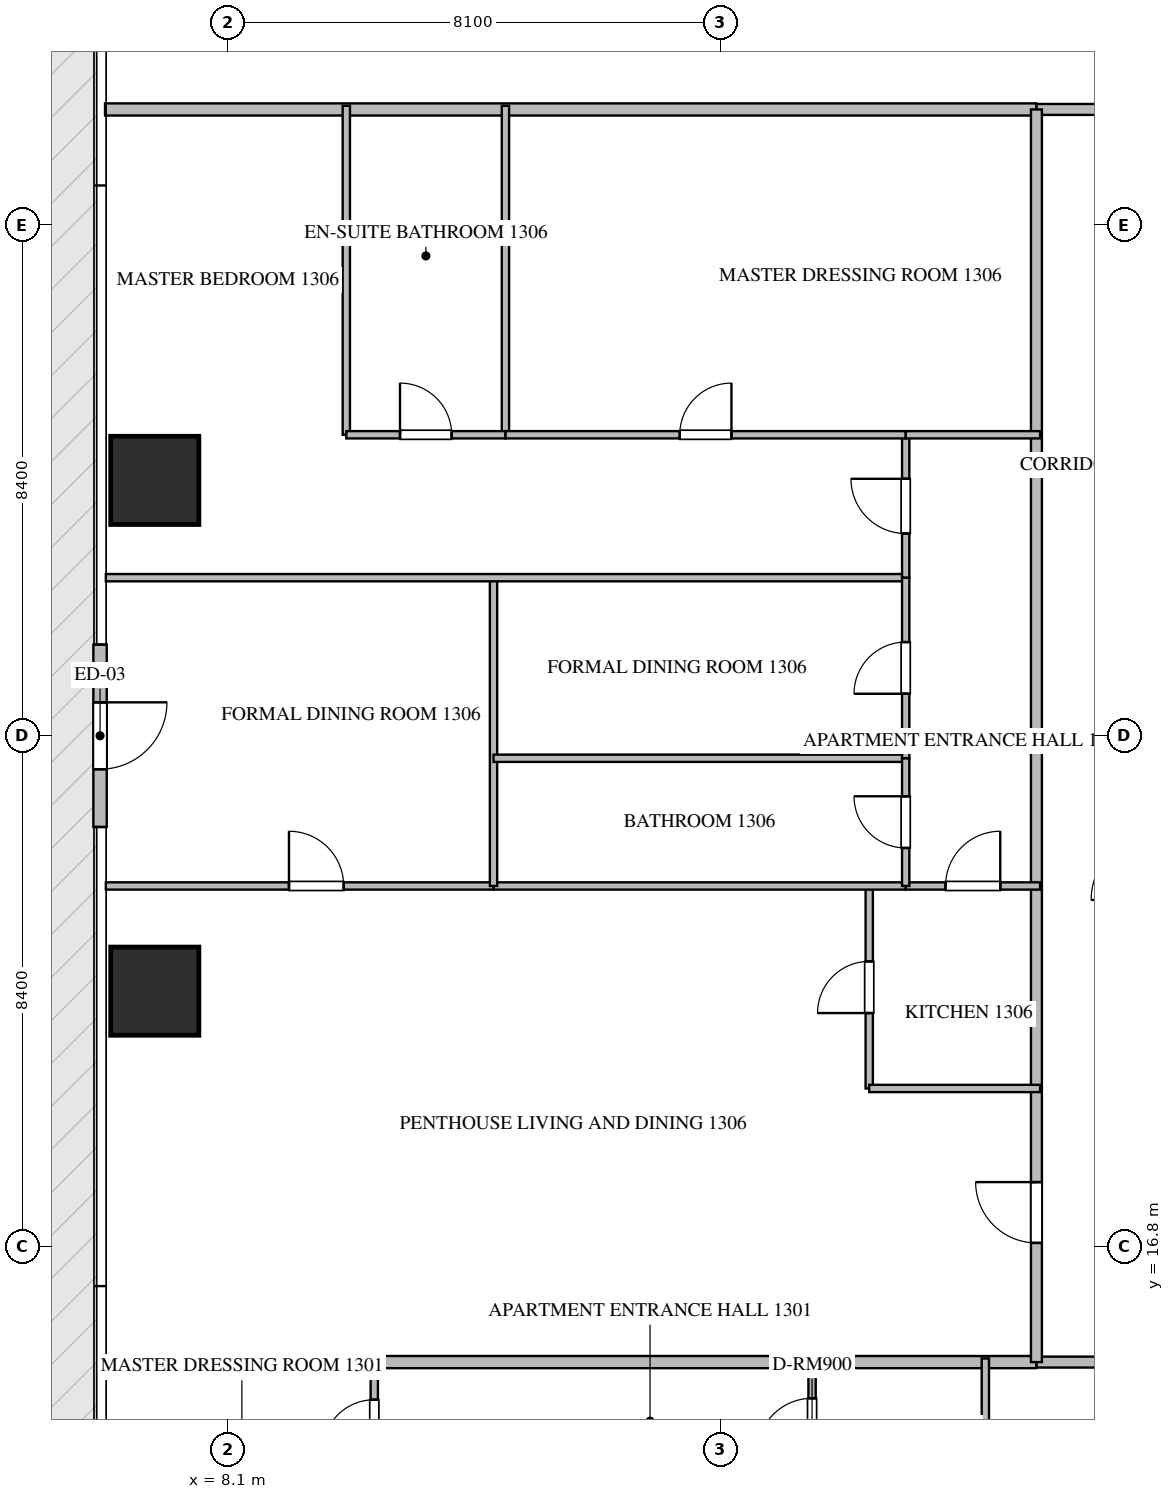
"""IFC4 building model, lengths in metres.
Left out: names, types, materials, properties, quantities, classifications, styles, units other than length and angle.
Written with IfcOpenShell. Run it as: python <this file> out.ifc"""

import sys

from ifc_helpers import new_model, si_unit, direction, frame, frame_2d, origin, origin_2d, place, context, subcontext, project, spatial, rectangle, extrude, source, transform, mapped, element, fill, save


model = new_model("IFC4")
c1 = context("Model", 3, precision=1e-05, world=origin(), true_north=direction((0.0, 1.0)))
c2 = subcontext(c1, "Body", "Model", "MODEL_VIEW")
j1 = project(units=[si_unit("LENGTHUNIT", "METRE"), si_unit("PLANEANGLEUNIT", "RADIAN")], contexts=[c1])
p1 = place(None, origin())
s1 = spatial("IfcSite", under=j1, at=p1, CompositionType="ELEMENT")
p2 = place(p1, origin())
s2 = spatial("IfcBuilding", under=s1, at=p2, CompositionType="ELEMENT")
p3 = place(p2, frame((0.0, 0.0, 56.7)))
s3 = spatial("IfcBuildingStorey", under=s2, at=p3, CompositionType="ELEMENT", Elevation=56.7)
m1 = source(origin(), c2, "Body", "SweptSolid", [
    extrude(rectangle(XDim=1.45, YDim=1.45, at=origin_2d()), origin(), (0.0, 0.0, 1.0), 3.75),
])
for number, where, z_axis, x_axis in (
    (1, (6.9, 21.0, -0.26), (0.0, 0.0, 1.0), (1.0, 0.0, 0.0)),
    (2, (6.9, 29.4, -0.26), (0.0, 0.0, 1.0), (1.0, 0.0, 0.0)),
):
    element("IfcColumn", number, at=place(p3, frame(where, z_axis=z_axis, x_axis=x_axis)), inside=s3, PredefinedType="COLUMN", context=c2, shape_type="MappedRepresentation", body=[
        mapped(m1, transform((0.0, 0.0, 0.0), scale=1.0)),
    ])
p4 = place(p3, frame((6.0, 26.7, 0.0), z_axis=(0.0, 0.0, 1.0), x_axis=(0.0, -1.0, 0.0)))
e3 = element("IfcWall", 3, at=p4, inside=s3, PredefinedType="ELEMENTEDWALL", context=c2, shape_type="SweptSolid", body=[
    extrude(rectangle(XDim=3.0, YDim=0.22, at=frame_2d((1.5, 0.0))), origin(), (0.0, 0.0, 1.0), 3.475),
])
p5 = place(p4, frame((0.95, 0.0, 0.0)))
e4 = element("IfcOpeningElement", 4, at=p5, cuts=e3, PredefinedType="OPENING", context=c2, shape_type="SweptSolid", body=[
    extrude(rectangle(XDim=1.1, YDim=2.2, at=frame_2d((0.55, 1.1))), frame((0.0, 0.12, 0.0), z_axis=(0.0, -1.0, 0.0), x_axis=(1.0, 0.0, 0.0)), (0.0, 0.0, 1.0), 0.24),
])
for number, where, z_axis, x_axis in (
    (5, (6.082, 14.9, 0.0), (0.0, 0.0, 1.0), (1.0, 0.0, 0.0)),
    (6, (6.082, 35.5, 0.0), (0.0, 0.0, 1.0), (1.0, 0.0, 0.0)),
):
    element("IfcWall", number, at=place(p3, frame(where, z_axis=z_axis, x_axis=x_axis)), inside=s3, PredefinedType="PARTITIONING", context=c2, shape_type="SweptSolid", body=[
        extrude(rectangle(XDim=15.318, YDim=0.2, at=frame_2d((7.659, 0.0))), origin(), (0.0, 0.0, 1.0), 3.49),
    ])
p6 = place(p3, frame((21.402, 14.9, 0.0), z_axis=(0.0, 0.0, 1.0), x_axis=(1.0, 0.0, 0.0)))
e7 = element("IfcWall", 7, at=p6, inside=s3, PredefinedType="PARTITIONING", context=c2, shape_type="SweptSolid", body=[
    extrude(rectangle(XDim=21.996, YDim=0.18, at=frame_2d((10.998, 0.0))), origin(), (0.0, 0.0, 1.0), 3.49),
])
p7 = place(p6, frame((1.96, 0.0, 0.0)))
e8 = element("IfcOpeningElement", 8, at=p7, cuts=e7, PredefinedType="OPENING", context=c2, shape_type="SweptSolid", body=[
    extrude(rectangle(XDim=1.0, YDim=2.15, at=frame_2d((0.5, 1.075))), frame((0.0, 0.1, 0.0), z_axis=(0.0, -1.0, 0.0), x_axis=(1.0, 0.0, 0.0)), (0.0, 0.0, 1.0), 0.2),
])
p8 = place(p6, frame((5.249, 0.0, 0.0)))
e9 = element("IfcOpeningElement", 9, at=p8, cuts=e7, PredefinedType="OPENING", context=c2, shape_type="SweptSolid", body=[
    extrude(rectangle(XDim=1.0, YDim=2.15, at=frame_2d((0.5, 1.075))), frame((0.0, 0.1, 0.0), z_axis=(0.0, -1.0, 0.0), x_axis=(1.0, 0.0, 0.0)), (0.0, 0.0, 1.0), 0.2),
])
p9 = place(p6, frame((11.653, 0.0, 0.0)))
e10 = element("IfcOpeningElement", 10, at=p9, cuts=e7, PredefinedType="OPENING", context=c2, shape_type="SweptSolid", body=[
    extrude(rectangle(XDim=1.0, YDim=2.15, at=frame_2d((0.5, 1.075))), frame((0.0, 0.1, 0.0), z_axis=(0.0, -1.0, 0.0), x_axis=(1.0, 0.0, 0.0)), (0.0, 0.0, 1.0), 0.2),
])
p10 = place(p6, frame((18.896, 0.0, 0.0)))
e11 = element("IfcOpeningElement", 11, at=p10, cuts=e7, PredefinedType="OPENING", context=c2, shape_type="SweptSolid", body=[
    extrude(rectangle(XDim=1.0, YDim=2.15, at=frame_2d((0.5, 1.075))), frame((0.0, 0.1, 0.0), z_axis=(0.0, -1.0, 0.0), x_axis=(1.0, 0.0, 0.0)), (0.0, 0.0, 1.0), 0.2),
])
p11 = place(p3, frame((21.402, 35.5, 0.0), z_axis=(0.0, 0.0, 1.0), x_axis=(1.0, 0.0, 0.0)))
e12 = element("IfcWall", 12, at=p11, inside=s3, PredefinedType="PARTITIONING", context=c2, shape_type="SweptSolid", body=[
    extrude(rectangle(XDim=21.996, YDim=0.18, at=frame_2d((10.998, 0.0))), origin(), (0.0, 0.0, 1.0), 3.49),
])
p12 = place(p11, frame((15.222, 0.0, 0.0)))
e13 = element("IfcOpeningElement", 13, at=p12, cuts=e12, PredefinedType="OPENING", context=c2, shape_type="SweptSolid", body=[
    extrude(rectangle(XDim=1.0, YDim=2.15, at=frame_2d((0.5, 1.075))), frame((0.0, 0.1, 0.0), z_axis=(0.0, -1.0, 0.0), x_axis=(1.0, 0.0, 0.0)), (0.0, 0.0, 1.0), 0.2),
])
p13 = place(p3, frame((21.4, 14.9, 0.0), z_axis=(0.0, 0.0, 1.0), x_axis=(0.0, 1.0, 0.0)))
e14 = element("IfcWall", 14, at=p13, inside=s3, PredefinedType="PARTITIONING", context=c2, shape_type="SweptSolid", body=[
    extrude(rectangle(XDim=20.6, YDim=0.18, at=frame_2d((10.3, 0.0))), origin(), (0.0, 0.0, 1.0), 3.49),
])
p14 = place(p13, frame((1.96, 0.0, 0.0)))
e15 = element("IfcOpeningElement", 15, at=p14, cuts=e14, PredefinedType="OPENING", context=c2, shape_type="SweptSolid", body=[
    extrude(rectangle(XDim=1.0, YDim=2.15, at=frame_2d((0.5, 1.075))), frame((0.0, 0.1, 0.0), z_axis=(0.0, -1.0, 0.0), x_axis=(1.0, 0.0, 0.0)), (0.0, 0.0, 1.0), 0.2),
])
p15 = place(p3, frame((20.56, 12.15, 0.0), z_axis=(0.0, 0.0, 1.0), x_axis=(0.0, 1.0, 0.0)))
e16 = element("IfcWall", 16, at=p15, inside=s3, PredefinedType="PARTITIONING", context=c2, shape_type="SweptSolid", body=[
    extrude(rectangle(XDim=2.81, YDim=0.12, at=frame_2d((1.405, 0.0))), origin(), (0.0, 0.0, 1.0), 3.49),
])
p16 = place(p3, frame((17.71, 12.75, 0.0), z_axis=(0.0, 0.0, 1.0), x_axis=(0.0, 1.0, 0.0)))
e17 = element("IfcWall", 17, at=p16, inside=s3, PredefinedType="PARTITIONING", context=c2, shape_type="SweptSolid", body=[
    extrude(rectangle(XDim=2.21, YDim=0.12, at=frame_2d((1.105, 0.0))), origin(), (0.0, 0.0, 1.0), 3.49),
])
p17 = place(p16, frame((0.655, 0.0, 0.0)))
e18 = element("IfcOpeningElement", 18, at=p17, cuts=e17, PredefinedType="OPENING", context=c2, shape_type="SweptSolid", body=[
    extrude(rectangle(XDim=0.9, YDim=2.1, at=frame_2d((0.45, 1.05))), frame((0.0, 0.07, 0.0), z_axis=(0.0, -1.0, 0.0), x_axis=(1.0, 0.0, 0.0)), (0.0, 0.0, 1.0), 0.14),
])
p18 = place(p3, frame((10.51, 12.752, 0.0), z_axis=(0.0, 0.0, 1.0), x_axis=(0.0, 1.0, 0.0)))
e19 = element("IfcWall", 19, at=p18, inside=s3, PredefinedType="PARTITIONING", context=c2, shape_type="SweptSolid", body=[
    extrude(rectangle(XDim=2.208, YDim=0.12, at=frame_2d((1.104, 0.0))), origin(), (0.0, 0.0, 1.0), 3.49),
])
p19 = place(p18, frame((0.679, 0.0, 0.0)))
e20 = element("IfcOpeningElement", 20, at=p19, cuts=e19, PredefinedType="OPENING", context=c2, shape_type="SweptSolid", body=[
    extrude(rectangle(XDim=0.85, YDim=2.1, at=frame_2d((0.425, 1.05))), frame((0.0, 0.07, 0.0), z_axis=(0.0, -1.0, 0.0), x_axis=(1.0, 0.0, 0.0)), (0.0, 0.0, 1.0), 0.14),
])
p20 = place(p3, frame((18.65, 19.4, 0.0), z_axis=(0.0, 0.0, 1.0), x_axis=(0.0, 1.0, 0.0)))
e21 = element("IfcWall", 21, at=p20, inside=s3, PredefinedType="PARTITIONING", context=c2, shape_type="SweptSolid", body=[
    extrude(rectangle(XDim=3.33, YDim=0.12, at=frame_2d((1.665, 0.0))), origin(), (0.0, 0.0, 1.0), 3.49),
])
p21 = place(p20, frame((1.24, 0.0, 0.0)))
e22 = element("IfcOpeningElement", 22, at=p21, cuts=e21, PredefinedType="OPENING", context=c2, shape_type="SweptSolid", body=[
    extrude(rectangle(XDim=0.85, YDim=2.1, at=frame_2d((0.425, 1.05))), frame((0.0, 0.07, 0.0), z_axis=(0.0, -1.0, 0.0), x_axis=(1.0, 0.0, 0.0)), (0.0, 0.0, 1.0), 0.14),
])
p22 = place(p3, frame((18.65, 19.4, 0.0), z_axis=(0.0, 0.0, 1.0), x_axis=(1.0, 0.0, 0.0)))
e23 = element("IfcWall", 23, at=p22, inside=s3, PredefinedType="PARTITIONING", context=c2, shape_type="SweptSolid", body=[
    extrude(rectangle(XDim=2.81, YDim=0.12, at=frame_2d((1.405, 0.0))), origin(), (0.0, 0.0, 1.0), 3.49),
])
p23 = place(p3, frame((19.25, 22.73, 0.0), z_axis=(0.0, 0.0, 1.0), x_axis=(1.0, 0.0, 0.0)))
e24 = element("IfcWall", 24, at=p23, inside=s3, PredefinedType="PARTITIONING", context=c2, shape_type="SweptSolid", body=[
    extrude(rectangle(XDim=2.21, YDim=0.12, at=frame_2d((1.105, 0.0))), origin(), (0.0, 0.0, 1.0), 3.49),
])
p24 = place(p23, frame((0.655, 0.0, 0.0)))
e25 = element("IfcOpeningElement", 25, at=p24, cuts=e24, PredefinedType="OPENING", context=c2, shape_type="SweptSolid", body=[
    extrude(rectangle(XDim=0.9, YDim=2.1, at=frame_2d((0.45, 1.05))), frame((0.0, 0.07, 0.0), z_axis=(0.0, -1.0, 0.0), x_axis=(1.0, 0.0, 0.0)), (0.0, 0.0, 1.0), 0.14),
])
p25 = place(p3, frame((6.095, 22.73, 0.0), z_axis=(0.0, 0.0, 1.0), x_axis=(1.0, 0.0, 0.0)))
e26 = element("IfcWall", 26, at=p25, inside=s3, PredefinedType="PARTITIONING", context=c2, shape_type="SweptSolid", body=[
    extrude(rectangle(XDim=6.376, YDim=0.12, at=frame_2d((3.188, 0.0))), origin(), (0.0, 0.0, 1.0), 3.49),
])
p26 = place(p25, frame((3.012, 0.0, 0.0)))
e27 = element("IfcOpeningElement", 27, at=p26, cuts=e26, PredefinedType="OPENING", context=c2, shape_type="SweptSolid", body=[
    extrude(rectangle(XDim=0.9, YDim=2.1, at=frame_2d((0.45, 1.05))), frame((0.0, 0.07, 0.0), z_axis=(0.0, -1.0, 0.0), x_axis=(1.0, 0.0, 0.0)), (0.0, 0.0, 1.0), 0.14),
])
p27 = place(p3, frame((12.473, 22.73, 0.0), z_axis=(0.0, 0.0, 1.0), x_axis=(1.0, 0.0, 0.0)))
e28 = element("IfcWall", 28, at=p27, inside=s3, PredefinedType="PARTITIONING", context=c2, shape_type="SweptSolid", body=[
    extrude(rectangle(XDim=6.775, YDim=0.12, at=frame_2d((3.388, 0.0))), origin(), (0.0, 0.0, 1.0), 3.49),
])
p28 = place(p3, frame((12.471, 22.73, 0.0), z_axis=(0.0, 0.0, 1.0), x_axis=(0.0, 1.0, 0.0)))
e29 = element("IfcWall", 29, at=p28, inside=s3, PredefinedType="PARTITIONING", context=c2, shape_type="SweptSolid", body=[
    extrude(rectangle(XDim=5.07, YDim=0.12, at=frame_2d((2.535, 0.0))), origin(), (0.0, 0.0, 1.0), 3.49),
])
p29 = place(p3, frame((6.095, 27.8, 0.0), z_axis=(0.0, 0.0, 1.0), x_axis=(1.0, 0.0, 0.0)))
e30 = element("IfcWall", 30, at=p29, inside=s3, PredefinedType="PARTITIONING", context=c2, shape_type="SweptSolid", body=[
    extrude(rectangle(XDim=13.155, YDim=0.12, at=frame_2d((6.578, 0.0))), origin(), (0.0, 0.0, 1.0), 3.49),
])
p30 = place(p3, frame((12.471, 24.83, 0.0), z_axis=(0.0, 0.0, 1.0), x_axis=(1.0, 0.0, 0.0)))
e31 = element("IfcWall", 31, at=p30, inside=s3, PredefinedType="PARTITIONING", context=c2, shape_type="SweptSolid", body=[
    extrude(rectangle(XDim=6.779, YDim=0.12, at=frame_2d((3.39, 0.0))), origin(), (0.0, 0.0, 1.0), 3.49),
])
p31 = place(p3, frame((19.25, 22.73, 0.0), z_axis=(0.0, 0.0, 1.0), x_axis=(0.0, 1.0, 0.0)))
e32 = element("IfcWall", 32, at=p31, inside=s3, PredefinedType="PARTITIONING", context=c2, shape_type="SweptSolid", body=[
    extrude(rectangle(XDim=2.1, YDim=0.12, at=frame_2d((1.05, 0.0))), origin(), (0.0, 0.0, 1.0), 3.49),
])
p32 = place(p31, frame((0.625, 0.0, 0.0)))
e33 = element("IfcOpeningElement", 33, at=p32, cuts=e32, PredefinedType="OPENING", context=c2, shape_type="SweptSolid", body=[
    extrude(rectangle(XDim=0.85, YDim=2.1, at=frame_2d((0.425, 1.05))), frame((0.0, 0.07, 0.0), z_axis=(0.0, -1.0, 0.0), x_axis=(1.0, 0.0, 0.0)), (0.0, 0.0, 1.0), 0.14),
])
p33 = place(p3, frame((19.25, 24.832, 0.0), z_axis=(0.0, 0.0, 1.0), x_axis=(0.0, 1.0, 0.0)))
e34 = element("IfcWall", 34, at=p33, inside=s3, PredefinedType="PARTITIONING", context=c2, shape_type="SweptSolid", body=[
    extrude(rectangle(XDim=2.968, YDim=0.12, at=frame_2d((1.484, 0.0))), origin(), (0.0, 0.0, 1.0), 3.49),
])
p34 = place(p33, frame((1.059, 0.0, 0.0)))
e35 = element("IfcOpeningElement", 35, at=p34, cuts=e34, PredefinedType="OPENING", context=c2, shape_type="SweptSolid", body=[
    extrude(rectangle(XDim=0.85, YDim=2.1, at=frame_2d((0.425, 1.05))), frame((0.0, 0.07, 0.0), z_axis=(0.0, -1.0, 0.0), x_axis=(1.0, 0.0, 0.0)), (0.0, 0.0, 1.0), 0.14),
])
p35 = place(p3, frame((19.25, 27.802, 0.0), z_axis=(0.0, 0.0, 1.0), x_axis=(0.0, 1.0, 0.0)))
e36 = element("IfcWall", 36, at=p35, inside=s3, PredefinedType="PARTITIONING", context=c2, shape_type="SweptSolid", body=[
    extrude(rectangle(XDim=2.348, YDim=0.12, at=frame_2d((1.174, 0.0))), origin(), (0.0, 0.0, 1.0), 3.49),
])
p36 = place(p35, frame((0.724, 0.0, 0.0)))
e37 = element("IfcOpeningElement", 37, at=p36, cuts=e36, PredefinedType="OPENING", context=c2, shape_type="SweptSolid", body=[
    extrude(rectangle(XDim=0.9, YDim=2.1, at=frame_2d((0.45, 1.05))), frame((0.0, 0.07, 0.0), z_axis=(0.0, -1.0, 0.0), x_axis=(1.0, 0.0, 0.0)), (0.0, 0.0, 1.0), 0.14),
])
for number, where, z_axis, x_axis in (
    (38, (10.05, 30.15, 0.0), (0.0, 0.0, 1.0), (0.0, 1.0, 0.0)),
    (39, (12.667, 30.15, 0.0), (0.0, 0.0, 1.0), (0.0, 1.0, 0.0)),
):
    element("IfcWall", number, at=place(p3, frame(where, z_axis=z_axis, x_axis=x_axis)), inside=s3, PredefinedType="PARTITIONING", context=c2, shape_type="SweptSolid", body=[
        extrude(rectangle(XDim=5.41, YDim=0.12, at=frame_2d((2.705, 0.0))), origin(), (0.0, 0.0, 1.0), 3.49),
    ])
p37 = place(p3, frame((10.05, 30.15, 0.0), z_axis=(0.0, 0.0, 1.0), x_axis=(1.0, 0.0, 0.0)))
e40 = element("IfcWall", 40, at=p37, inside=s3, PredefinedType="PARTITIONING", context=c2, shape_type="SweptSolid", body=[
    extrude(rectangle(XDim=2.617, YDim=0.12, at=frame_2d((1.309, 0.0))), origin(), (0.0, 0.0, 1.0), 3.49),
])
p38 = place(p37, frame((0.883, 0.0, 0.0)))
e41 = element("IfcOpeningElement", 41, at=p38, cuts=e40, PredefinedType="OPENING", context=c2, shape_type="SweptSolid", body=[
    extrude(rectangle(XDim=0.85, YDim=2.1, at=frame_2d((0.425, 1.05))), frame((0.0, 0.07, 0.0), z_axis=(0.0, -1.0, 0.0), x_axis=(1.0, 0.0, 0.0)), (0.0, 0.0, 1.0), 0.14),
])
p39 = place(p3, frame((12.669, 30.15, 0.0), z_axis=(0.0, 0.0, 1.0), x_axis=(1.0, 0.0, 0.0)))
e42 = element("IfcWall", 42, at=p39, inside=s3, PredefinedType="PARTITIONING", context=c2, shape_type="SweptSolid", body=[
    extrude(rectangle(XDim=6.581, YDim=0.12, at=frame_2d((3.291, 0.0))), origin(), (0.0, 0.0, 1.0), 3.49),
])
p40 = place(p39, frame((2.865, 0.0, 0.0)))
e43 = element("IfcOpeningElement", 43, at=p40, cuts=e42, PredefinedType="OPENING", context=c2, shape_type="SweptSolid", body=[
    extrude(rectangle(XDim=0.85, YDim=2.1, at=frame_2d((0.425, 1.05))), frame((0.0, 0.07, 0.0), z_axis=(0.0, -1.0, 0.0), x_axis=(1.0, 0.0, 0.0)), (0.0, 0.0, 1.0), 0.14),
])
p41 = place(p3, frame((19.252, 30.15, 0.0), z_axis=(0.0, 0.0, 1.0), x_axis=(1.0, 0.0, 0.0)))
e44 = element("IfcWall", 44, at=p41, inside=s3, PredefinedType="PARTITIONING", context=c2, shape_type="SweptSolid", body=[
    extrude(rectangle(XDim=2.208, YDim=0.12, at=frame_2d((1.104, 0.0))), origin(), (0.0, 0.0, 1.0), 3.49),
])
m2 = source(origin(), c2, "Body", "SweptSolid", [
    extrude(rectangle(XDim=1.1, YDim=2.2, at=frame_2d((0.55, 1.1))), frame((0.0, 0.025, 0.0), z_axis=(0.0, -1.0, 0.0), x_axis=(1.0, 0.0, 0.0)), (0.0, 0.0, 1.0), 0.05),
])
p42 = place(p5, origin())
e45 = element("IfcDoor", 45, at=p42, inside=s3, OperationType="SINGLE_SWING_LEFT", PredefinedType="DOOR", context=c2, shape_type="MappedRepresentation", body=[
    mapped(m2, transform((0.0, 0.0, 0.0), scale=1.0)),
])
fill(e4, e45)
m3 = source(origin(), c2, "Body", "SweptSolid", [
    extrude(rectangle(XDim=1.0, YDim=2.15, at=frame_2d((0.5, 1.075))), frame((0.0, 0.025, 0.0), z_axis=(0.0, -1.0, 0.0), x_axis=(1.0, 0.0, 0.0)), (0.0, 0.0, 1.0), 0.05),
])
p43 = place(p14, origin())
e46 = element("IfcDoor", 46, at=p43, inside=s3, OperationType="SINGLE_SWING_RIGHT", PredefinedType="DOOR", context=c2, shape_type="MappedRepresentation", body=[
    mapped(m3, transform((0.0, 0.0, 0.0), scale=1.0)),
])
fill(e15, e46)
m4 = source(origin(), c2, "Body", "SweptSolid", [
    extrude(rectangle(XDim=0.9, YDim=2.1, at=frame_2d((0.45, 1.05))), frame((0.0, 0.025, 0.0), z_axis=(0.0, -1.0, 0.0), x_axis=(1.0, 0.0, 0.0)), (0.0, 0.0, 1.0), 0.05),
])
p44 = place(p17, origin())
e47 = element("IfcDoor", 47, at=p44, inside=s3, OperationType="SINGLE_SWING_LEFT", PredefinedType="DOOR", context=c2, shape_type="MappedRepresentation", body=[
    mapped(m4, transform((0.0, 0.0, 0.0), scale=1.0)),
])
fill(e18, e47)
m5 = source(origin(), c2, "Body", "SweptSolid", [
    extrude(rectangle(XDim=0.85, YDim=2.1, at=frame_2d((0.425, 1.05))), frame((0.0, 0.025, 0.0), z_axis=(0.0, -1.0, 0.0), x_axis=(1.0, 0.0, 0.0)), (0.0, 0.0, 1.0), 0.05),
])
p45 = place(p19, origin())
e48 = element("IfcDoor", 48, at=p45, inside=s3, OperationType="SINGLE_SWING_LEFT", PredefinedType="DOOR", context=c2, shape_type="MappedRepresentation", body=[
    mapped(m5, transform((0.0, 0.0, 0.0), scale=1.0)),
])
fill(e20, e48)
p46 = place(p21, origin())
e49 = element("IfcDoor", 49, at=p46, inside=s3, OperationType="SINGLE_SWING_LEFT", PredefinedType="DOOR", context=c2, shape_type="MappedRepresentation", body=[
    mapped(m5, transform((0.0, 0.0, 0.0), scale=1.0)),
])
fill(e22, e49)
p47 = place(p24, origin())
e50 = element("IfcDoor", 50, at=p47, inside=s3, OperationType="SINGLE_SWING_RIGHT", PredefinedType="DOOR", context=c2, shape_type="MappedRepresentation", body=[
    mapped(m4, transform((0.0, 0.0, 0.0), scale=1.0)),
])
fill(e25, e50)
p48 = place(p26, origin())
e51 = element("IfcDoor", 51, at=p48, inside=s3, OperationType="SINGLE_SWING_LEFT", PredefinedType="DOOR", context=c2, shape_type="MappedRepresentation", body=[
    mapped(m4, transform((0.0, 0.0, 0.0), scale=1.0)),
])
fill(e27, e51)
p49 = place(p32, origin())
e52 = element("IfcDoor", 52, at=p49, inside=s3, OperationType="SINGLE_SWING_RIGHT", PredefinedType="DOOR", context=c2, shape_type="MappedRepresentation", body=[
    mapped(m5, transform((0.0, 0.0, 0.0), scale=1.0)),
])
fill(e33, e52)
p50 = place(p34, origin())
e53 = element("IfcDoor", 53, at=p50, inside=s3, OperationType="SINGLE_SWING_LEFT", PredefinedType="DOOR", context=c2, shape_type="MappedRepresentation", body=[
    mapped(m5, transform((0.0, 0.0, 0.0), scale=1.0)),
])
fill(e35, e53)
p51 = place(p36, origin())
e54 = element("IfcDoor", 54, at=p51, inside=s3, OperationType="SINGLE_SWING_RIGHT", PredefinedType="DOOR", context=c2, shape_type="MappedRepresentation", body=[
    mapped(m4, transform((0.0, 0.0, 0.0), scale=1.0)),
])
fill(e37, e54)
p52 = place(p38, origin())
e55 = element("IfcDoor", 55, at=p52, inside=s3, OperationType="SINGLE_SWING_LEFT", PredefinedType="DOOR", context=c2, shape_type="MappedRepresentation", body=[
    mapped(m5, transform((0.0, 0.0, 0.0), scale=1.0)),
])
fill(e41, e55)
p53 = place(p40, origin())
e56 = element("IfcDoor", 56, at=p53, inside=s3, OperationType="SINGLE_SWING_RIGHT", PredefinedType="DOOR", context=c2, shape_type="MappedRepresentation", body=[
    mapped(m5, transform((0.0, 0.0, 0.0), scale=1.0)),
])
fill(e43, e56)
save(model, sys.argv[1])
